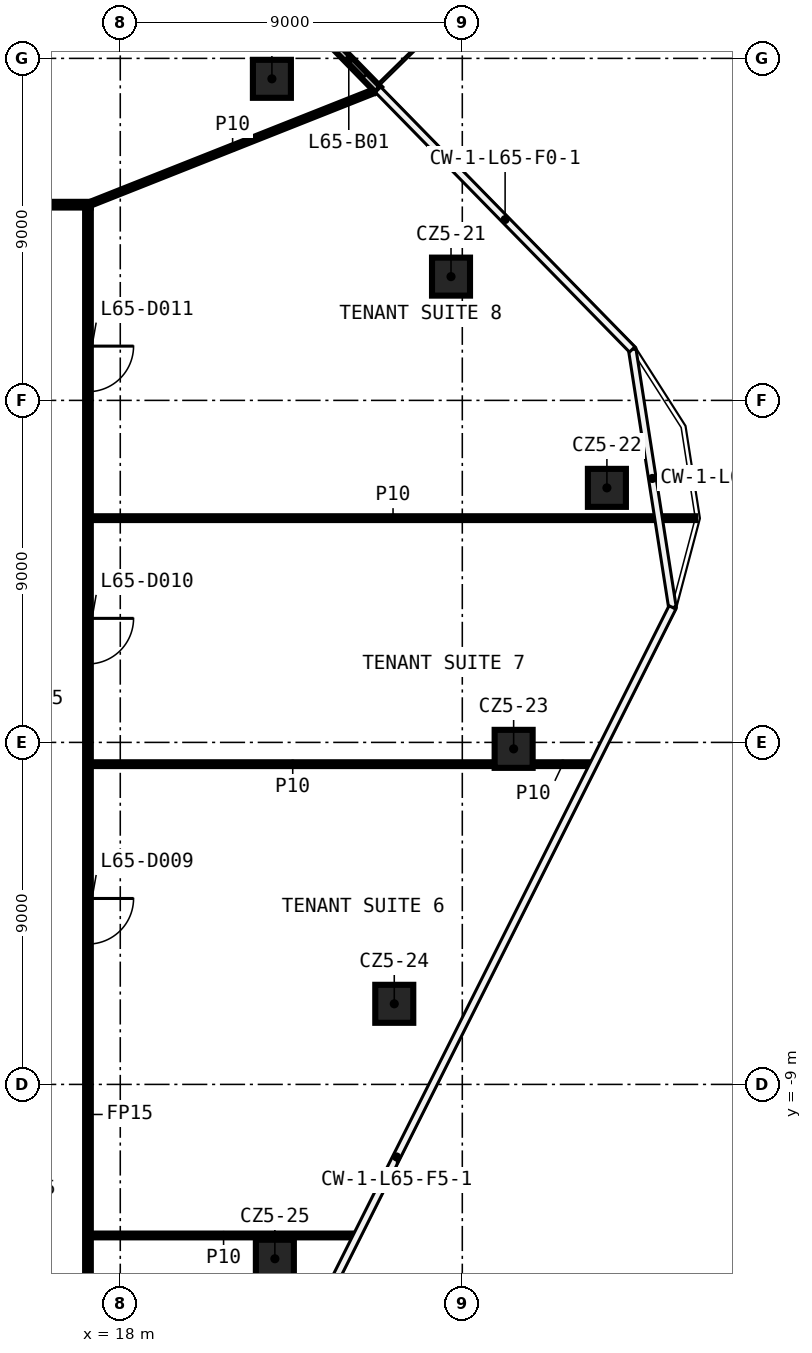
"""IFC4 building model, lengths in metres.
Left out: names, types, materials, properties, quantities, classifications, styles, units other than length and angle.
Written with IfcOpenShell. Run it as: python <this file> out.ifc"""

import sys

from ifc_helpers import new_model, si_unit, direction, frame, frame_2d, origin, origin_2d, place, context, subcontext, project, spatial, rectangle, extrude, element, fill, save


model = new_model("IFC4")
c1 = context("Model", 3, precision=1e-05, world=origin(), true_north=direction((0.0, 1.0)))
c2 = subcontext(c1, "Body", "Model", "MODEL_VIEW")
j1 = project(units=[si_unit("LENGTHUNIT", "METRE"), si_unit("PLANEANGLEUNIT", "RADIAN")], contexts=[c1])
p1 = place(None, origin())
s1 = spatial("IfcSite", under=j1, at=p1, CompositionType="ELEMENT")
p2 = place(p1, origin())
s2 = spatial("IfcBuilding", under=s1, at=p2, CompositionType="ELEMENT")
p3 = place(p2, frame((0.0, 0.0, 306.8)))
s3 = spatial("IfcBuildingStorey", under=s2, at=p3, CompositionType="ELEMENT", Elevation=306.8)
for number, where, z_axis, x_axis in (
    (1, (21.99, 17.462, 0.0), (0.0, 0.0, 1.0), (1.0, 0.0, 0.0)),
    (2, (26.703, 12.257, 0.0), (0.0, 0.0, 1.0), (1.0, 0.0, 0.0)),
    (3, (30.805, 6.698, 0.0), (0.0, 0.0, 1.0), (1.0, 0.0, 0.0)),
    (4, (28.351, -0.17, 0.0), (0.0, 0.0, 1.0), (1.0, 0.0, 0.0)),
    (5, (25.21, -6.879, 0.0), (0.0, 0.0, 1.0), (1.0, 0.0, 0.0)),
    (6, (22.068, -13.588, 0.0), (0.0, 0.0, 1.0), (1.0, 0.0, 0.0)),
):
    element("IfcColumn", number, at=place(p3, frame(where, z_axis=z_axis, x_axis=x_axis)), inside=s3, PredefinedType="COLUMN", context=c2, shape_type="SweptSolid", body=[
        extrude(rectangle(XDim=1.0, YDim=1.0, at=origin_2d()), origin(), (0.0, 0.0, 1.0), 3.82),
    ])
p4 = place(p3, frame((17.225, -12.975, 0.0), z_axis=(0.0, 0.0, 1.0), x_axis=(1.0, 0.0, 0.0)))
e7 = element("IfcWall", 7, at=p4, inside=s3, PredefinedType="PARTITIONING", context=c2, shape_type="SweptSolid", body=[
    extrude(rectangle(XDim=6.987, YDim=0.1, at=frame_2d((3.493, 0.0))), origin(), (0.0, 0.0, 1.0), 3.82),
])
p5 = place(p3, frame((17.225, -0.573, 0.0), z_axis=(0.0, 0.0, 1.0), x_axis=(1.0, 0.0, 0.0)))
e8 = element("IfcWall", 8, at=p5, inside=s3, PredefinedType="PARTITIONING", context=c2, shape_type="SweptSolid", body=[
    extrude(rectangle(XDim=10.626, YDim=0.1, at=frame_2d((5.313, 0.0))), origin(), (0.0, 0.0, 1.0), 3.82),
])
p6 = place(p3, frame((28.851, -0.573, 0.0), z_axis=(0.0, 0.0, 1.0), x_axis=(1.0, 0.0, 0.0)))
e9 = element("IfcWall", 9, at=p6, inside=s3, PredefinedType="PARTITIONING", context=c2, shape_type="SweptSolid", body=[
    extrude(rectangle(XDim=1.586, YDim=0.1, at=frame_2d((0.793, 0.0))), origin(), (0.0, 0.0, 1.0), 3.82),
])
p7 = place(p3, frame((17.225, 5.901, 0.0), z_axis=(0.0, 0.0, 1.0), x_axis=(1.0, 0.0, 0.0)))
e10 = element("IfcWall", 10, at=p7, inside=s3, PredefinedType="PARTITIONING", context=c2, shape_type="SweptSolid", body=[
    extrude(rectangle(XDim=15.905, YDim=0.1, at=frame_2d((7.953, 0.0))), origin(), (0.0, 0.0, 1.0), 3.82),
])
p8 = place(p3, frame((-17.225, 14.15, 0.0), z_axis=(0.0, 0.0, 1.0), x_axis=(1.0, 0.0, 0.0)))
e11 = element("IfcWall", 11, at=p8, inside=s3, PredefinedType="PARTITIONING", context=c2, shape_type="SweptSolid", body=[
    extrude(rectangle(XDim=34.45, YDim=0.15, at=frame_2d((17.225, 0.0))), origin(), (0.0, 0.0, 1.0), 3.82),
])
p9 = place(p8, frame((31.607, 0.0, 0.0)))
e12 = element("IfcOpeningElement", 12, at=p9, cuts=e11, PredefinedType="OPENING", context=c2, shape_type="SweptSolid", body=[
    extrude(rectangle(XDim=1.2, YDim=2.1, at=frame_2d((0.6, 1.05))), frame((0.0, 0.085, 0.0), z_axis=(0.0, -1.0, 0.0), x_axis=(1.0, 0.0, 0.0)), (0.0, 0.0, 1.0), 0.17),
])
p10 = place(p8, frame((25.936, 0.0, 0.0)))
e13 = element("IfcOpeningElement", 13, at=p10, cuts=e11, PredefinedType="OPENING", context=c2, shape_type="SweptSolid", body=[
    extrude(rectangle(XDim=1.2, YDim=2.1, at=frame_2d((0.6, 1.05))), frame((0.0, 0.085, 0.0), z_axis=(0.0, -1.0, 0.0), x_axis=(1.0, 0.0, 0.0)), (0.0, 0.0, 1.0), 0.17),
])
p11 = place(p8, frame((17.707, 0.0, 0.0)))
e14 = element("IfcOpeningElement", 14, at=p11, cuts=e11, PredefinedType="OPENING", context=c2, shape_type="SweptSolid", body=[
    extrude(rectangle(XDim=1.2, YDim=2.1, at=frame_2d((0.6, 1.05))), frame((0.0, 0.085, 0.0), z_axis=(0.0, -1.0, 0.0), x_axis=(1.0, 0.0, 0.0)), (0.0, 0.0, 1.0), 0.17),
])
p12 = place(p8, frame((10.617, 0.0, 0.0)))
e15 = element("IfcOpeningElement", 15, at=p12, cuts=e11, PredefinedType="OPENING", context=c2, shape_type="SweptSolid", body=[
    extrude(rectangle(XDim=1.2, YDim=2.1, at=frame_2d((0.6, 1.05))), frame((0.0, 0.085, 0.0), z_axis=(0.0, -1.0, 0.0), x_axis=(1.0, 0.0, 0.0)), (0.0, 0.0, 1.0), 0.17),
])
p13 = place(p8, frame((5.896, 0.0, 0.0)))
e16 = element("IfcOpeningElement", 16, at=p13, cuts=e11, PredefinedType="OPENING", context=c2, shape_type="SweptSolid", body=[
    extrude(rectangle(XDim=1.2, YDim=2.1, at=frame_2d((0.6, 1.05))), frame((0.0, 0.085, 0.0), z_axis=(0.0, -1.0, 0.0), x_axis=(1.0, 0.0, 0.0)), (0.0, 0.0, 1.0), 0.17),
])
p14 = place(p8, frame((1.506, 0.0, 0.0)))
e17 = element("IfcOpeningElement", 17, at=p14, cuts=e11, PredefinedType="OPENING", context=c2, shape_type="SweptSolid", body=[
    extrude(rectangle(XDim=1.2, YDim=2.1, at=frame_2d((0.6, 1.05))), frame((0.0, 0.085, 0.0), z_axis=(0.0, -1.0, 0.0), x_axis=(1.0, 0.0, 0.0)), (0.0, 0.0, 1.0), 0.17),
])
p15 = place(p3, frame((17.15, 14.15, 0.0), z_axis=(0.0, 0.0, 1.0), x_axis=(0.92958283513, 0.368613283308, 0.0)))
e18 = element("IfcWall", 18, at=p15, inside=s3, PredefinedType="PARTITIONING", context=c2, shape_type="SweptSolid", body=[
    extrude(rectangle(XDim=8.189, YDim=0.1, at=frame_2d((4.094, 0.0))), origin(), (0.0, 0.0, 1.0), 3.82),
])
p16 = place(p3, frame((17.15, 14.075, 0.0), z_axis=(0.0, 0.0, 1.0), x_axis=(0.0, -1.0, 0.0)))
e19 = element("IfcWall", 19, at=p16, inside=s3, PredefinedType="PARTITIONING", context=c2, shape_type="SweptSolid", body=[
    extrude(rectangle(XDim=28.15, YDim=0.15, at=frame_2d((14.075, 0.0))), origin(), (0.0, 0.0, 1.0), 3.82),
])
p17 = place(p16, frame((18.182, 0.0, 0.0)))
e20 = element("IfcOpeningElement", 20, at=p17, cuts=e19, PredefinedType="OPENING", context=c2, shape_type="SweptSolid", body=[
    extrude(rectangle(XDim=1.2, YDim=2.1, at=frame_2d((0.6, 1.05))), frame((0.0, 0.085, 0.0), z_axis=(0.0, -1.0, 0.0), x_axis=(1.0, 0.0, 0.0)), (0.0, 0.0, 1.0), 0.17),
])
p18 = place(p16, frame((10.811, 0.0, 0.0)))
e21 = element("IfcOpeningElement", 21, at=p18, cuts=e19, PredefinedType="OPENING", context=c2, shape_type="SweptSolid", body=[
    extrude(rectangle(XDim=1.2, YDim=2.1, at=frame_2d((0.6, 1.05))), frame((0.0, 0.085, 0.0), z_axis=(0.0, -1.0, 0.0), x_axis=(1.0, 0.0, 0.0)), (0.0, 0.0, 1.0), 0.17),
])
p19 = place(p16, frame((3.647, 0.0, 0.0)))
e22 = element("IfcOpeningElement", 22, at=p19, cuts=e19, PredefinedType="OPENING", context=c2, shape_type="SweptSolid", body=[
    extrude(rectangle(XDim=1.2, YDim=2.1, at=frame_2d((0.6, 1.05))), frame((0.0, 0.085, 0.0), z_axis=(0.0, -1.0, 0.0), x_axis=(1.0, 0.0, 0.0)), (0.0, 0.0, 1.0), 0.17),
])
p20 = place(p3, frame((24.782, 17.177, 0.0), z_axis=(0.0, 0.0, 1.0), x_axis=(-0.699351369698, 0.714778050657, 0.0)))
e23 = element("IfcWall", 23, at=p20, inside=s3, PredefinedType="SOLIDWALL", context=c2, shape_type="SweptSolid", body=[
    extrude(rectangle(XDim=9.575, YDim=0.2, at=frame_2d((4.787, 0.0))), origin(), (0.0, 0.0, 1.0), 3.82),
])
p21 = place(p20, frame((2.0, 0.0, 0.6)))
e24 = element("IfcOpeningElement", 24, at=p21, cuts=e23, PredefinedType="OPENING", context=c2, shape_type="SweptSolid", body=[
    extrude(rectangle(XDim=1.6, YDim=2.4, at=frame_2d((0.8, 1.2))), frame((0.0, 0.11, 0.0), z_axis=(0.0, -1.0, 0.0), x_axis=(1.0, 0.0, 0.0)), (0.0, 0.0, 1.0), 0.22),
])
p22 = place(p20, frame((0.5, 0.0, 0.0)))
e25 = element("IfcOpeningElement", 25, at=p22, cuts=e23, PredefinedType="OPENING", context=c2, shape_type="SweptSolid", body=[
    extrude(rectangle(XDim=1.2, YDim=2.4, at=frame_2d((0.6, 1.2))), frame((0.0, 0.11, 0.0), z_axis=(0.0, -1.0, 0.0), x_axis=(1.0, 0.0, 0.0)), (0.0, 0.0, 1.0), 0.22),
])
p23 = place(p20, frame((6.787, 0.0, 0.6)))
e26 = element("IfcOpeningElement", 26, at=p23, cuts=e23, PredefinedType="OPENING", context=c2, shape_type="SweptSolid", body=[
    extrude(rectangle(XDim=1.6, YDim=2.4, at=frame_2d((0.8, 1.2))), frame((0.0, 0.11, 0.0), z_axis=(0.0, -1.0, 0.0), x_axis=(1.0, 0.0, 0.0)), (0.0, 0.0, 1.0), 0.22),
])
p24 = place(p20, frame((5.287, 0.0, 0.0)))
e27 = element("IfcOpeningElement", 27, at=p24, cuts=e23, PredefinedType="OPENING", context=c2, shape_type="SweptSolid", body=[
    extrude(rectangle(XDim=1.2, YDim=2.4, at=frame_2d((0.6, 1.2))), frame((0.0, 0.11, 0.0), z_axis=(0.0, -1.0, 0.0), x_axis=(1.0, 0.0, 0.0)), (0.0, 0.0, 1.0), 0.22),
])
p25 = place(p17, origin())
e28 = element("IfcDoor", 28, at=p25, inside=s3, OperationType="SINGLE_SWING_RIGHT", PredefinedType="DOOR", context=c2, shape_type="SweptSolid", body=[
    extrude(rectangle(XDim=1.2, YDim=2.1, at=frame_2d((0.6, 1.05))), frame((0.0, 0.025, 0.0), z_axis=(0.0, -1.0, 0.0), x_axis=(1.0, 0.0, 0.0)), (0.0, 0.0, 1.0), 0.05),
])
fill(e20, e28)
p26 = place(p18, origin())
e29 = element("IfcDoor", 29, at=p26, inside=s3, OperationType="SINGLE_SWING_LEFT", PredefinedType="DOOR", context=c2, shape_type="SweptSolid", body=[
    extrude(rectangle(XDim=1.2, YDim=2.1, at=frame_2d((0.6, 1.05))), frame((0.0, 0.025, 0.0), z_axis=(0.0, -1.0, 0.0), x_axis=(1.0, 0.0, 0.0)), (0.0, 0.0, 1.0), 0.05),
])
fill(e21, e29)
p27 = place(p19, origin())
e30 = element("IfcDoor", 30, at=p27, inside=s3, OperationType="SINGLE_SWING_RIGHT", PredefinedType="DOOR", context=c2, shape_type="SweptSolid", body=[
    extrude(rectangle(XDim=1.2, YDim=2.1, at=frame_2d((0.6, 1.05))), frame((0.0, 0.025, 0.0), z_axis=(0.0, -1.0, 0.0), x_axis=(1.0, 0.0, 0.0)), (0.0, 0.0, 1.0), 0.05),
])
fill(e22, e30)
p28 = place(p22, origin())
e31 = element("IfcDoor", 31, at=p28, inside=s3, OperationType="SLIDING_TO_LEFT", PredefinedType="DOOR", context=c2, shape_type="SweptSolid", body=[
    extrude(rectangle(XDim=1.2, YDim=2.4, at=frame_2d((0.6, 1.2))), frame((0.0, 0.025, 0.0), z_axis=(0.0, -1.0, 0.0), x_axis=(1.0, 0.0, 0.0)), (0.0, 0.0, 1.0), 0.05),
])
fill(e25, e31)
save(model, sys.argv[1])
